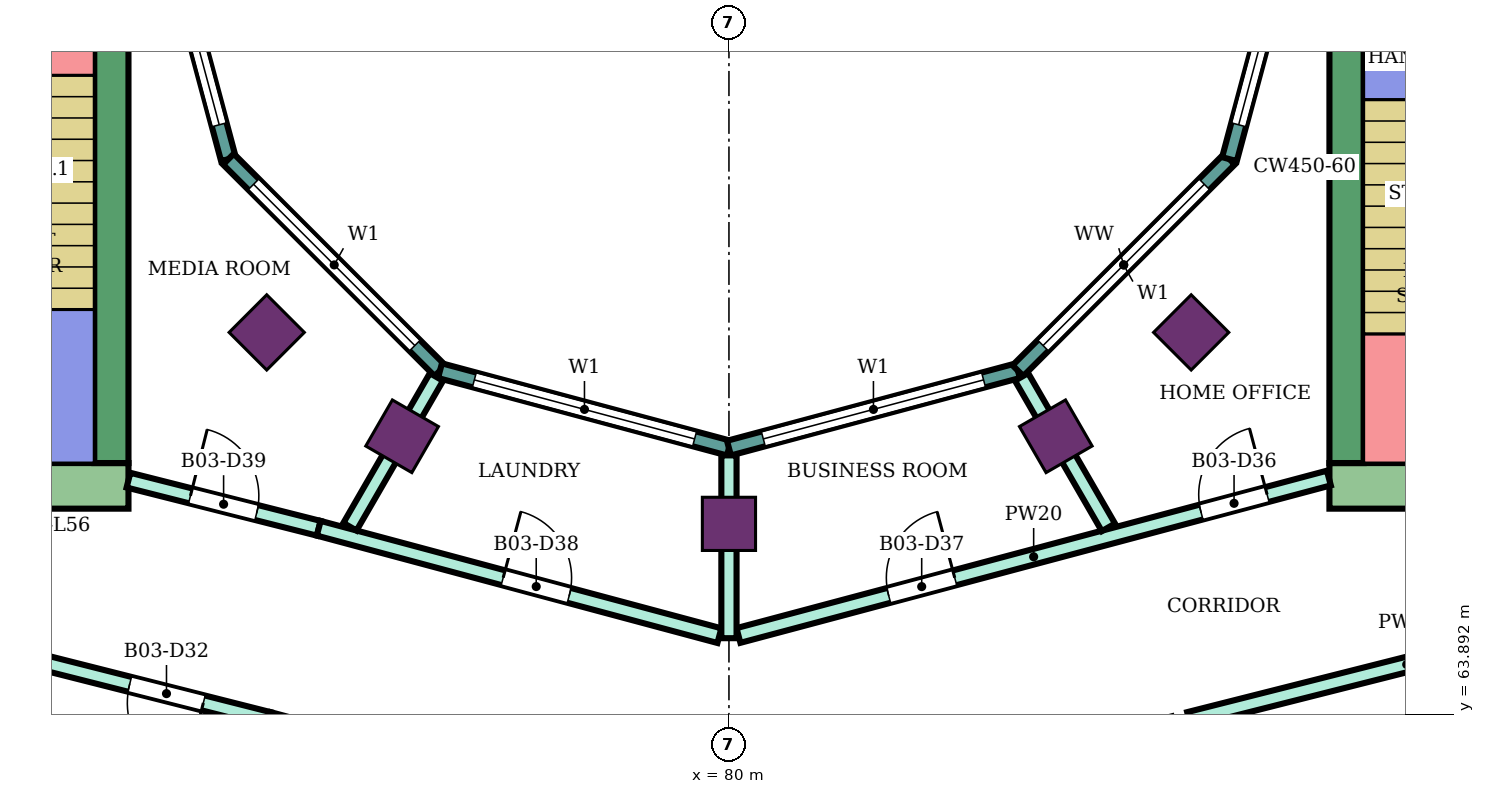
"""IFC4 building model, lengths in metres.
Left out: names, types, materials, properties, quantities, classifications, styles, units other than length and angle.
Written with IfcOpenShell. Run it as: python <this file> out.ifc"""

import sys

from ifc_helpers import new_model, si_unit, direction, frame, frame_2d, origin, origin_2d, place, context, subcontext, project, spatial, rectangle, extrude, element, fill, save


model = new_model("IFC4")
c1 = context("Model", 3, precision=1e-05, world=origin(), true_north=direction((0.0, 1.0)))
c2 = subcontext(c1, "Body", "Model", "MODEL_VIEW")
j1 = project(units=[si_unit("LENGTHUNIT", "METRE"), si_unit("PLANEANGLEUNIT", "RADIAN")], contexts=[c1])
p1 = place(None, origin())
s1 = spatial("IfcSite", under=j1, at=p1, CompositionType="ELEMENT")
p2 = place(p1, origin())
s2 = spatial("IfcBuilding", under=s1, at=p2, CompositionType="ELEMENT")
p3 = place(p2, frame((0.0, 0.0, 245.7)))
s3 = spatial("IfcBuildingStorey", under=s2, at=p3, CompositionType="ELEMENT", Elevation=245.7)
for number, where, z_axis, x_axis in (
    (1, (73.919, 68.919, 0.0), (0.0, 0.0, 1.0), (-0.707, -0.707, 0.0)),
    (2, (75.7, 67.552, 0.0), (0.0, 0.0, 1.0), (-0.5, -0.866, 0.0)),
    (3, (80.0, 66.4, 0.0), (0.0, 0.0, 1.0), (0.0, -1.0, 0.0)),
    (4, (84.3, 67.552, 0.0), (0.0, 0.0, 1.0), (0.5, -0.866, 0.0)),
    (5, (86.081, 68.919, 0.0), (0.0, 0.0, 1.0), (0.707, -0.707, 0.0)),
):
    element("IfcColumn", number, at=place(p3, frame(where, z_axis=z_axis, x_axis=x_axis)), inside=s3, PredefinedType="COLUMN", context=c2, shape_type="SweptSolid", body=[
        extrude(rectangle(XDim=0.7, YDim=0.7, at=origin_2d()), origin(), (0.0, 0.0, 1.0), 4.2),
    ])
p4 = place(p3, frame((87.9, 66.9, 0.0), z_axis=(0.0, 0.0, 1.0), x_axis=(1.0, 0.0, 0.0)))
e6 = element("IfcWall", 6, at=p4, inside=s3, PredefinedType="SHEAR", context=c2, shape_type="SweptSolid", body=[
    extrude(rectangle(XDim=14.9, YDim=0.6, at=frame_2d((7.45, 0.0))), origin(), (0.0, 0.0, 1.0), 3.88),
])
p5 = place(p4, frame((4.2, 0.0, 0.0)))
e7 = element("IfcOpeningElement", 7, at=p5, cuts=e6, PredefinedType="OPENING", context=c2, shape_type="SweptSolid", body=[
    extrude(rectangle(XDim=2.4, YDim=2.4, at=frame_2d((1.2, 1.2))), frame((0.0, 0.31, 0.0), z_axis=(0.0, -1.0, 0.0), x_axis=(1.0, 0.0, 0.0)), (0.0, 0.0, 1.0), 0.62),
])
p6 = place(p3, frame((88.125, 67.2, 0.0), z_axis=(0.0, 0.0, 1.0), x_axis=(0.0, 1.0, 0.0)))
e8 = element("IfcWall", 8, at=p6, inside=s3, PredefinedType="SHEAR", context=c2, shape_type="SweptSolid", body=[
    extrude(rectangle(XDim=7.8, YDim=0.45, at=frame_2d((3.9, 0.0))), origin(), (0.0, 0.0, 1.0), 3.88),
])
p7 = place(p3, frame((72.1, 66.9, 0.0), z_axis=(0.0, 0.0, 1.0), x_axis=(-1.0, 0.0, 0.0)))
e9 = element("IfcWall", 9, at=p7, inside=s3, PredefinedType="SHEAR", context=c2, shape_type="SweptSolid", body=[
    extrude(rectangle(XDim=14.9, YDim=0.6, at=frame_2d((7.45, 0.0))), origin(), (0.0, 0.0, 1.0), 3.88),
])
p8 = place(p7, frame((4.2, 0.0, 0.0)))
e10 = element("IfcOpeningElement", 10, at=p8, cuts=e9, PredefinedType="OPENING", context=c2, shape_type="SweptSolid", body=[
    extrude(rectangle(XDim=2.4, YDim=2.4, at=frame_2d((1.2, 1.2))), frame((0.0, 0.31, 0.0), z_axis=(0.0, -1.0, 0.0), x_axis=(1.0, 0.0, 0.0)), (0.0, 0.0, 1.0), 0.62),
])
p9 = place(p3, frame((71.875, 75.0, 0.0), z_axis=(0.0, 0.0, 1.0), x_axis=(0.0, -1.0, 0.0)))
e11 = element("IfcWall", 11, at=p9, inside=s3, PredefinedType="SHEAR", context=c2, shape_type="SweptSolid", body=[
    extrude(rectangle(XDim=7.8, YDim=0.45, at=frame_2d((3.9, 0.0))), origin(), (0.0, 0.0, 1.0), 3.88),
])
p10 = place(p3, frame((72.396, 75.0, 0.0), z_axis=(0.0, 0.0, 1.0), x_axis=(0.258789828301, -0.965933654434, 0.0)))
e12 = element("IfcWall", 12, at=p10, inside=s3, PredefinedType="NOTDEFINED", context=c2, shape_type="SweptSolid", body=[
    extrude(rectangle(XDim=3.936, YDim=0.2, at=frame_2d((1.968, 0.0))), origin(), (0.0, 0.0, 1.0), 4.2),
])
p11 = place(p10, frame((0.468, 0.0, 0.9)))
e13 = element("IfcOpeningElement", 13, at=p11, cuts=e12, PredefinedType="OPENING", context=c2, shape_type="SweptSolid", body=[
    extrude(rectangle(XDim=3.0, YDim=2.3, at=frame_2d((1.5, 1.15))), frame((0.0, 0.11, 0.0), z_axis=(0.0, -1.0, 0.0), x_axis=(1.0, 0.0, 0.0)), (0.0, 0.0, 1.0), 0.22),
])
p12 = place(p3, frame((73.415, 71.198, 0.0), z_axis=(0.0, 0.0, 1.0), x_axis=(0.707106781187, -0.707106781187, 0.0)))
e14 = element("IfcWall", 14, at=p12, inside=s3, PredefinedType="NOTDEFINED", context=c2, shape_type="SweptSolid", body=[
    extrude(rectangle(XDim=3.936, YDim=0.2, at=frame_2d((1.968, 0.0))), origin(), (0.0, 0.0, 1.0), 4.2),
])
p13 = place(p12, frame((0.468, 0.0, 0.9)))
e15 = element("IfcOpeningElement", 15, at=p13, cuts=e14, PredefinedType="OPENING", context=c2, shape_type="SweptSolid", body=[
    extrude(rectangle(XDim=3.0, YDim=2.3, at=frame_2d((1.5, 1.15))), frame((0.0, 0.11, 0.0), z_axis=(0.0, -1.0, 0.0), x_axis=(1.0, 0.0, 0.0)), (0.0, 0.0, 1.0), 0.22),
])
p14 = place(p3, frame((76.198, 68.415, 0.0), z_axis=(0.0, 0.0, 1.0), x_axis=(0.965933654434, -0.258789828301, 0.0)))
e16 = element("IfcWall", 16, at=p14, inside=s3, PredefinedType="NOTDEFINED", context=c2, shape_type="SweptSolid", body=[
    extrude(rectangle(XDim=3.936, YDim=0.2, at=frame_2d((1.968, 0.0))), origin(), (0.0, 0.0, 1.0), 4.2),
])
p15 = place(p14, frame((0.468, 0.0, 0.9)))
e17 = element("IfcOpeningElement", 17, at=p15, cuts=e16, PredefinedType="OPENING", context=c2, shape_type="SweptSolid", body=[
    extrude(rectangle(XDim=3.0, YDim=2.3, at=frame_2d((1.5, 1.15))), frame((0.0, 0.11, 0.0), z_axis=(0.0, -1.0, 0.0), x_axis=(1.0, 0.0, 0.0)), (0.0, 0.0, 1.0), 0.22),
])
p16 = place(p3, frame((80.0, 67.396, 0.0), z_axis=(0.0, 0.0, 1.0), x_axis=(0.965933654434, 0.258789828301, 0.0)))
e18 = element("IfcWall", 18, at=p16, inside=s3, PredefinedType="NOTDEFINED", context=c2, shape_type="SweptSolid", body=[
    extrude(rectangle(XDim=3.936, YDim=0.2, at=frame_2d((1.968, 0.0))), origin(), (0.0, 0.0, 1.0), 4.2),
])
p17 = place(p16, frame((0.468, 0.0, 0.9)))
e19 = element("IfcOpeningElement", 19, at=p17, cuts=e18, PredefinedType="OPENING", context=c2, shape_type="SweptSolid", body=[
    extrude(rectangle(XDim=3.0, YDim=2.3, at=frame_2d((1.5, 1.15))), frame((0.0, 0.11, 0.0), z_axis=(0.0, -1.0, 0.0), x_axis=(1.0, 0.0, 0.0)), (0.0, 0.0, 1.0), 0.22),
])
p18 = place(p3, frame((83.802, 68.415, 0.0), z_axis=(0.0, 0.0, 1.0), x_axis=(0.707106781187, 0.707106781187, 0.0)))
e20 = element("IfcWall", 20, at=p18, inside=s3, PredefinedType="NOTDEFINED", context=c2, shape_type="SweptSolid", body=[
    extrude(rectangle(XDim=3.936, YDim=0.2, at=frame_2d((1.968, 0.0))), origin(), (0.0, 0.0, 1.0), 4.2),
])
p19 = place(p18, frame((0.468, 0.0, 0.9)))
e21 = element("IfcOpeningElement", 21, at=p19, cuts=e20, PredefinedType="OPENING", context=c2, shape_type="SweptSolid", body=[
    extrude(rectangle(XDim=3.0, YDim=2.3, at=frame_2d((1.5, 1.15))), frame((0.0, 0.11, 0.0), z_axis=(0.0, -1.0, 0.0), x_axis=(1.0, 0.0, 0.0)), (0.0, 0.0, 1.0), 0.22),
])
p20 = place(p3, frame((86.585, 71.198, 0.0), z_axis=(0.0, 0.0, 1.0), x_axis=(0.258789828301, 0.965933654434, 0.0)))
e22 = element("IfcWall", 22, at=p20, inside=s3, PredefinedType="NOTDEFINED", context=c2, shape_type="SweptSolid", body=[
    extrude(rectangle(XDim=3.936, YDim=0.2, at=frame_2d((1.968, 0.0))), origin(), (0.0, 0.0, 1.0), 4.2),
])
p21 = place(p20, frame((0.468, 0.0, 0.9)))
e23 = element("IfcOpeningElement", 23, at=p21, cuts=e22, PredefinedType="OPENING", context=c2, shape_type="SweptSolid", body=[
    extrude(rectangle(XDim=3.0, YDim=2.3, at=frame_2d((1.5, 1.15))), frame((0.0, 0.11, 0.0), z_axis=(0.0, -1.0, 0.0), x_axis=(1.0, 0.0, 0.0)), (0.0, 0.0, 1.0), 0.22),
])
p22 = place(p3, frame((68.2, 65.28, 0.0), z_axis=(0.0, 0.0, 1.0), x_axis=(0.969450596516, -0.245286650503, 0.0)))
e24 = element("IfcWall", 24, at=p22, inside=s3, PredefinedType="PARTITIONING", context=c2, shape_type="SweptSolid", body=[
    extrude(rectangle(XDim=5.928, YDim=0.2, at=frame_2d((2.964, 0.0))), origin(), (0.0, 0.0, 1.0), 3.75),
])
p23 = place(p22, frame((4.039, 0.0, 0.0)))
e25 = element("IfcOpeningElement", 25, at=p23, cuts=e24, PredefinedType="OPENING", context=c2, shape_type="SweptSolid", body=[
    extrude(rectangle(XDim=1.0, YDim=2.1, at=frame_2d((0.5, 1.05))), frame((0.0, 0.11, 0.0), z_axis=(0.0, -1.0, 0.0), x_axis=(1.0, 0.0, 0.0)), (0.0, 0.0, 1.0), 0.22),
])
p24 = place(p3, frame((72.1, 66.975, 0.0), z_axis=(0.0, 0.0, 1.0), x_axis=(0.969471314457, -0.245204752086, 0.0)))
e26 = element("IfcWall", 26, at=p24, inside=s3, PredefinedType="PARTITIONING", context=c2, shape_type="SweptSolid", body=[
    extrude(rectangle(XDim=2.582, YDim=0.2, at=frame_2d((1.291, 0.0))), origin(), (0.0, 0.0, 1.0), 3.75),
])
p25 = place(p24, frame((0.841, 0.0, 0.0)))
e27 = element("IfcOpeningElement", 27, at=p25, cuts=e26, PredefinedType="OPENING", context=c2, shape_type="SweptSolid", body=[
    extrude(rectangle(XDim=0.9, YDim=2.1, at=frame_2d((0.45, 1.05))), frame((0.0, 0.11, 0.0), z_axis=(0.0, -1.0, 0.0), x_axis=(1.0, 0.0, 0.0)), (0.0, 0.0, 1.0), 0.22),
])
p26 = place(p3, frame((73.947, 63.826, 0.0), z_axis=(0.0, 0.0, 1.0), x_axis=(0.965908253407, -0.258884619088, 0.0)))
e28 = element("IfcWall", 28, at=p26, inside=s3, PredefinedType="PARTITIONING", context=c2, shape_type="SweptSolid", body=[
    extrude(rectangle(XDim=6.217, YDim=0.2, at=frame_2d((3.108, 0.0))), origin(), (0.0, 0.0, 1.0), 3.75),
])
p27 = place(p3, frame((74.603, 66.342, 0.0), z_axis=(0.0, 0.0, 1.0), x_axis=(0.965920893652, -0.258837453254, 0.0)))
e29 = element("IfcWall", 29, at=p27, inside=s3, PredefinedType="PARTITIONING", context=c2, shape_type="SweptSolid", body=[
    extrude(rectangle(XDim=5.458, YDim=0.2, at=frame_2d((2.729, 0.0))), origin(), (0.0, 0.0, 1.0), 3.75),
])
p28 = place(p27, frame((2.512, 0.0, 0.0)))
e30 = element("IfcOpeningElement", 30, at=p28, cuts=e29, PredefinedType="OPENING", context=c2, shape_type="SweptSolid", body=[
    extrude(rectangle(XDim=0.9, YDim=2.1, at=frame_2d((0.45, 1.05))), frame((0.0, 0.11, 0.0), z_axis=(0.0, -1.0, 0.0), x_axis=(1.0, 0.0, 0.0)), (0.0, 0.0, 1.0), 0.22),
])
p29 = place(p3, frame((75.014, 66.362, 0.0), z_axis=(0.0, 0.0, 1.0), x_axis=(0.500097042406, 0.865969369075, 0.0)))
e31 = element("IfcWall", 31, at=p29, inside=s3, PredefinedType="PARTITIONING", context=c2, shape_type="SweptSolid", body=[
    extrude(rectangle(XDim=2.275, YDim=0.2, at=frame_2d((1.138, 0.0))), origin(), (0.0, 0.0, 1.0), 3.75),
])
p30 = place(p3, frame((80.125, 64.932, 0.0), z_axis=(0.0, 0.0, 1.0), x_axis=(0.966236955806, 0.257655089674, 0.0)))
e32 = element("IfcWall", 32, at=p30, inside=s3, PredefinedType="PARTITIONING", context=c2, shape_type="SweptSolid", body=[
    extrude(rectangle(XDim=8.039, YDim=0.2, at=frame_2d((4.02, 0.0))), origin(), (0.0, 0.0, 1.0), 3.75),
])
p31 = place(p30, frame((6.298, 0.0, 0.0)))
e33 = element("IfcOpeningElement", 33, at=p31, cuts=e32, PredefinedType="OPENING", context=c2, shape_type="SweptSolid", body=[
    extrude(rectangle(XDim=0.9, YDim=2.1, at=frame_2d((0.45, 1.05))), frame((0.0, 0.11, 0.0), z_axis=(0.0, -1.0, 0.0), x_axis=(1.0, 0.0, 0.0)), (0.0, 0.0, 1.0), 0.22),
])
p32 = place(p30, frame((2.045, 0.0, 0.0)))
e34 = element("IfcOpeningElement", 34, at=p32, cuts=e32, PredefinedType="OPENING", context=c2, shape_type="SweptSolid", body=[
    extrude(rectangle(XDim=0.9, YDim=2.1, at=frame_2d((0.45, 1.05))), frame((0.0, 0.11, 0.0), z_axis=(0.0, -1.0, 0.0), x_axis=(1.0, 0.0, 0.0)), (0.0, 0.0, 1.0), 0.22),
])
p33 = place(p3, frame((80.0, 64.896, 0.0), z_axis=(0.0, 0.0, 1.0), x_axis=(0.0, 1.0, 0.0)))
e35 = element("IfcWall", 35, at=p33, inside=s3, PredefinedType="PARTITIONING", context=c2, shape_type="SweptSolid", body=[
    extrude(rectangle(XDim=2.405, YDim=0.2, at=frame_2d((1.203, 0.0))), origin(), (0.0, 0.0, 1.0), 3.75),
])
p34 = place(p3, frame((83.85, 68.333, 0.0), z_axis=(0.0, 0.0, 1.0), x_axis=(0.500080019051, -0.865979199835, 0.0)))
e36 = element("IfcWall", 36, at=p34, inside=s3, PredefinedType="PARTITIONING", context=c2, shape_type="SweptSolid", body=[
    extrude(rectangle(XDim=2.285, YDim=0.2, at=frame_2d((1.143, 0.0))), origin(), (0.0, 0.0, 1.0), 3.75),
])
p35 = place(p3, frame((86.053, 63.826, 0.0), z_axis=(0.0, 0.0, 1.0), x_axis=(0.969490004987, 0.245130843083, 0.0)))
e37 = element("IfcWall", 37, at=p35, inside=s3, PredefinedType="PARTITIONING", context=c2, shape_type="SweptSolid", body=[
    extrude(rectangle(XDim=5.908, YDim=0.2, at=frame_2d((2.954, 0.0))), origin(), (0.0, 0.0, 1.0), 3.75),
])
p36 = place(p11, origin())
e38 = element("IfcWindow", 38, at=p36, inside=s3, PartitioningType="SINGLE_PANEL", PredefinedType="WINDOW", context=c2, shape_type="SweptSolid", body=[
    extrude(rectangle(XDim=3.0, YDim=2.3, at=frame_2d((1.5, 1.15))), frame((0.0, 0.03, 0.0), z_axis=(0.0, -1.0, 0.0), x_axis=(1.0, 0.0, 0.0)), (0.0, 0.0, 1.0), 0.06),
])
fill(e13, e38)
p37 = place(p13, origin())
e39 = element("IfcWindow", 39, at=p37, inside=s3, PartitioningType="SINGLE_PANEL", PredefinedType="WINDOW", context=c2, shape_type="SweptSolid", body=[
    extrude(rectangle(XDim=3.0, YDim=2.3, at=frame_2d((1.5, 1.15))), frame((0.0, 0.03, 0.0), z_axis=(0.0, -1.0, 0.0), x_axis=(1.0, 0.0, 0.0)), (0.0, 0.0, 1.0), 0.06),
])
fill(e15, e39)
p38 = place(p15, origin())
e40 = element("IfcWindow", 40, at=p38, inside=s3, PartitioningType="SINGLE_PANEL", PredefinedType="WINDOW", context=c2, shape_type="SweptSolid", body=[
    extrude(rectangle(XDim=3.0, YDim=2.3, at=frame_2d((1.5, 1.15))), frame((0.0, 0.03, 0.0), z_axis=(0.0, -1.0, 0.0), x_axis=(1.0, 0.0, 0.0)), (0.0, 0.0, 1.0), 0.06),
])
fill(e17, e40)
p39 = place(p17, origin())
e41 = element("IfcWindow", 41, at=p39, inside=s3, PartitioningType="SINGLE_PANEL", PredefinedType="WINDOW", context=c2, shape_type="SweptSolid", body=[
    extrude(rectangle(XDim=3.0, YDim=2.3, at=frame_2d((1.5, 1.15))), frame((0.0, 0.03, 0.0), z_axis=(0.0, -1.0, 0.0), x_axis=(1.0, 0.0, 0.0)), (0.0, 0.0, 1.0), 0.06),
])
fill(e19, e41)
p40 = place(p19, origin())
e42 = element("IfcWindow", 42, at=p40, inside=s3, PartitioningType="SINGLE_PANEL", PredefinedType="WINDOW", context=c2, shape_type="SweptSolid", body=[
    extrude(rectangle(XDim=3.0, YDim=2.3, at=frame_2d((1.5, 1.15))), frame((0.0, 0.03, 0.0), z_axis=(0.0, -1.0, 0.0), x_axis=(1.0, 0.0, 0.0)), (0.0, 0.0, 1.0), 0.06),
])
fill(e21, e42)
p41 = place(p21, origin())
e43 = element("IfcWindow", 43, at=p41, inside=s3, PartitioningType="SINGLE_PANEL", PredefinedType="WINDOW", context=c2, shape_type="SweptSolid", body=[
    extrude(rectangle(XDim=3.0, YDim=2.3, at=frame_2d((1.5, 1.15))), frame((0.0, 0.03, 0.0), z_axis=(0.0, -1.0, 0.0), x_axis=(1.0, 0.0, 0.0)), (0.0, 0.0, 1.0), 0.06),
])
fill(e23, e43)
p42 = place(p23, frame((1.0, 0.0, 0.0), z_axis=(0.0, 0.0, 1.0), x_axis=(-1.0, 0.0, 0.0)))
e44 = element("IfcDoor", 44, at=p42, inside=s3, OperationType="SINGLE_SWING_LEFT", PredefinedType="DOOR", context=c2, shape_type="SweptSolid", body=[
    extrude(rectangle(XDim=1.0, YDim=2.1, at=frame_2d((0.5, 1.05))), frame((0.0, 0.025, 0.0), z_axis=(0.0, -1.0, 0.0), x_axis=(1.0, 0.0, 0.0)), (0.0, 0.0, 1.0), 0.05),
])
fill(e25, e44)
p43 = place(p31, origin())
e45 = element("IfcDoor", 45, at=p43, inside=s3, OperationType="SINGLE_SWING_RIGHT", PredefinedType="DOOR", context=c2, shape_type="SweptSolid", body=[
    extrude(rectangle(XDim=0.9, YDim=2.1, at=frame_2d((0.45, 1.05))), frame((0.0, 0.025, 0.0), z_axis=(0.0, -1.0, 0.0), x_axis=(1.0, 0.0, 0.0)), (0.0, 0.0, 1.0), 0.05),
])
fill(e33, e45)
p44 = place(p32, origin())
e46 = element("IfcDoor", 46, at=p44, inside=s3, OperationType="SINGLE_SWING_RIGHT", PredefinedType="DOOR", context=c2, shape_type="SweptSolid", body=[
    extrude(rectangle(XDim=0.9, YDim=2.1, at=frame_2d((0.45, 1.05))), frame((0.0, 0.025, 0.0), z_axis=(0.0, -1.0, 0.0), x_axis=(1.0, 0.0, 0.0)), (0.0, 0.0, 1.0), 0.05),
])
fill(e34, e46)
p45 = place(p28, origin())
e47 = element("IfcDoor", 47, at=p45, inside=s3, OperationType="SINGLE_SWING_LEFT", PredefinedType="DOOR", context=c2, shape_type="SweptSolid", body=[
    extrude(rectangle(XDim=0.9, YDim=2.1, at=frame_2d((0.45, 1.05))), frame((0.0, 0.025, 0.0), z_axis=(0.0, -1.0, 0.0), x_axis=(1.0, 0.0, 0.0)), (0.0, 0.0, 1.0), 0.05),
])
fill(e30, e47)
p46 = place(p25, origin())
e48 = element("IfcDoor", 48, at=p46, inside=s3, OperationType="SINGLE_SWING_LEFT", PredefinedType="DOOR", context=c2, shape_type="SweptSolid", body=[
    extrude(rectangle(XDim=0.9, YDim=2.1, at=frame_2d((0.45, 1.05))), frame((0.0, 0.025, 0.0), z_axis=(0.0, -1.0, 0.0), x_axis=(1.0, 0.0, 0.0)), (0.0, 0.0, 1.0), 0.05),
])
fill(e27, e48)
save(model, sys.argv[1])
